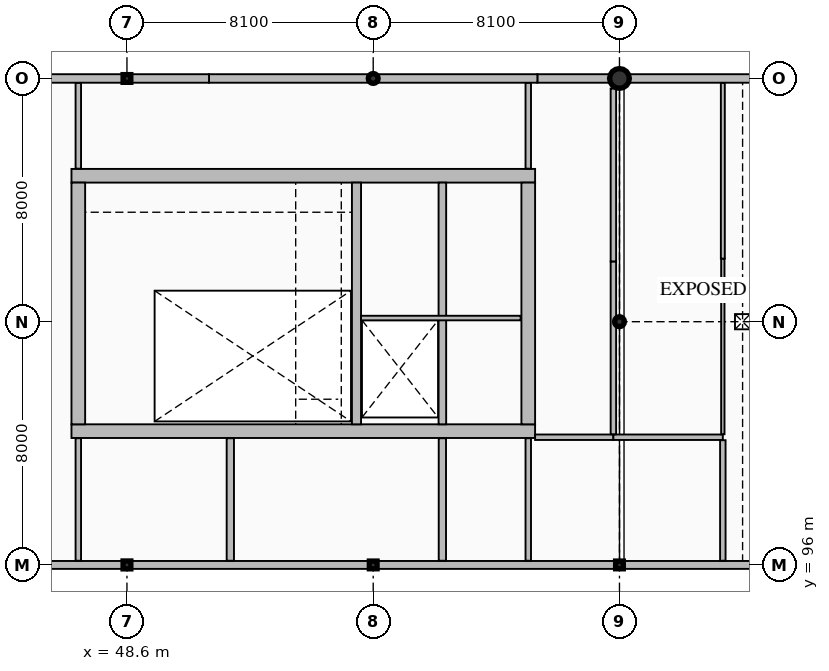
"""IFC4 building model, lengths in metres.
Left out: names, types, materials, properties, quantities, classifications, styles, units other than length and angle.
Written with IfcOpenShell. Run it as: python <this file> out.ifc"""

import sys

from ifc_helpers import new_model, si_unit, direction, frame, frame_2d, origin, origin_2d, place, context, subcontext, project, spatial, rectangle, hollow_rectangle, circle, hollow_circle, i_section, extrude, element, fill, save


model = new_model("IFC4")
c1 = context("Model", 3, precision=1e-05, world=origin(), true_north=direction((0.0, 1.0)))
c2 = subcontext(c1, "Body", "Model", "MODEL_VIEW")
j1 = project(units=[si_unit("LENGTHUNIT", "METRE"), si_unit("PLANEANGLEUNIT", "RADIAN")], contexts=[c1])
p1 = place(None, origin())
s1 = spatial("IfcSite", under=j1, at=p1, CompositionType="ELEMENT")
p2 = place(p1, origin())
s2 = spatial("IfcBuilding", under=s1, at=p2, CompositionType="ELEMENT")
p3 = place(p2, frame((0.0, 0.0, 29.1)))
s3 = spatial("IfcBuildingStorey", under=s2, at=p3, CompositionType="ELEMENT", Elevation=29.1)
p4 = place(p3, frame((46.775, 100.4, 0.0), z_axis=(0.0, 0.0, 1.0), x_axis=(1.0, 0.0, 0.0)))
e1 = element("IfcWall", 1, at=p4, inside=s3, PredefinedType="SHEAR", context=c2, shape_type="SweptSolid", body=[
    extrude(rectangle(XDim=15.25, YDim=0.45, at=frame_2d((7.625, 0.0))), origin(), (0.0, 0.0, 1.0), 4.2),
])
p5 = place(p4, frame((0.975, 0.0, 0.0)))
e2 = element("IfcOpeningElement", 2, at=p5, cuts=e1, PredefinedType="OPENING", context=c2, shape_type="SweptSolid", body=[
    extrude(rectangle(XDim=1.15, YDim=2.25, at=frame_2d((0.575, 1.125))), frame((0.0, 0.235, 0.0), z_axis=(0.0, -1.0, 0.0), x_axis=(1.0, 0.0, 0.0)), (0.0, 0.0, 1.0), 0.47),
])
p6 = place(p4, frame((10.258, 0.0, 0.0)))
e3 = element("IfcOpeningElement", 3, at=p6, cuts=e1, PredefinedType="OPENING", context=c2, shape_type="SweptSolid", body=[
    extrude(rectangle(XDim=1.1, YDim=2.2, at=frame_2d((0.55, 1.1))), frame((0.0, 0.235, 0.0), z_axis=(0.0, -1.0, 0.0), x_axis=(1.0, 0.0, 0.0)), (0.0, 0.0, 1.0), 0.47),
])
p7 = place(p4, frame((12.972, 0.0, 0.0)))
e4 = element("IfcOpeningElement", 4, at=p7, cuts=e1, PredefinedType="OPENING", context=c2, shape_type="SweptSolid", body=[
    extrude(rectangle(XDim=1.1, YDim=2.2, at=frame_2d((0.55, 1.1))), frame((0.0, 0.235, 0.0), z_axis=(0.0, -1.0, 0.0), x_axis=(1.0, 0.0, 0.0)), (0.0, 0.0, 1.0), 0.47),
])
p8 = place(p3, frame((46.775, 108.8, 0.0), z_axis=(0.0, 0.0, 1.0), x_axis=(1.0, 0.0, 0.0)))
e5 = element("IfcWall", 5, at=p8, inside=s3, PredefinedType="SHEAR", context=c2, shape_type="SweptSolid", body=[
    extrude(rectangle(XDim=15.25, YDim=0.45, at=frame_2d((7.625, 0.0))), origin(), (0.0, 0.0, 1.0), 4.2),
])
for number, where, z_axis, x_axis in (
    (6, (47.0, 100.625, 0.0), (0.0, 0.0, 1.0), (0.0, 1.0, 0.0)),
    (7, (61.8, 100.625, 0.0), (0.0, 0.0, 1.0), (0.0, 1.0, 0.0)),
):
    element("IfcWall", number, at=place(p3, frame(where, z_axis=z_axis, x_axis=x_axis)), inside=s3, PredefinedType="SHEAR", context=c2, shape_type="SweptSolid", body=[
        extrude(rectangle(XDim=7.95, YDim=0.45, at=frame_2d((3.975, 0.0))), origin(), (0.0, 0.0, 1.0), 4.2),
    ])
p9 = place(p3, frame((56.15, 100.625, 0.0), z_axis=(0.0, 0.0, 1.0), x_axis=(0.0, 1.0, 0.0)))
e8 = element("IfcWall", 8, at=p9, inside=s3, PredefinedType="SHEAR", context=c2, shape_type="SweptSolid", body=[
    extrude(rectangle(XDim=7.95, YDim=0.3, at=frame_2d((3.975, 0.0))), origin(), (0.0, 0.0, 1.0), 4.2),
])
p10 = place(p3, frame((58.975, 100.625, 0.0), z_axis=(0.0, 0.0, 1.0), x_axis=(0.0, 1.0, 0.0)))
e9 = element("IfcWall", 9, at=p10, inside=s3, PredefinedType="SHEAR", context=c2, shape_type="SweptSolid", body=[
    extrude(rectangle(XDim=7.95, YDim=0.25, at=frame_2d((3.975, 0.0))), origin(), (0.0, 0.0, 1.0), 4.2),
])
p11 = place(p3, frame((48.6, 96.0, 0.0), z_axis=(0.0, 0.0, 1.0), x_axis=(1.0, 0.0, 0.0)))
e10 = element("IfcColumn", 10, at=p11, inside=s3, PredefinedType="COLUMN", context=c2, shape_type="SweptSolid", body=[
    extrude(i_section(OverallWidth=0.256, OverallDepth=0.26, WebThickness=0.011, FlangeThickness=0.017, FilletRadius=0.013, at=origin_2d()), origin(), (0.0, 0.0, 1.0), 4.2),
])
for number, where, z_axis, x_axis in (
    (11, (48.6, 112.0, 0.0), (0.0, 0.0, 1.0), (1.0, 0.0, 0.0)),
    (12, (56.7, 96.0, 0.0), (0.0, 0.0, 1.0), (1.0, 0.0, 0.0)),
):
    element("IfcColumn", number, at=place(p3, frame(where, z_axis=z_axis, x_axis=x_axis)), inside=s3, PredefinedType="COLUMN", context=c2, shape_type="SweptSolid", body=[
        extrude(hollow_rectangle(XDim=0.254, YDim=0.254, WallThickness=0.013, InnerFilletRadius=0.013, OuterFilletRadius=0.025, at=origin_2d()), origin(), (0.0, 0.0, 1.0), 4.2),
    ])
p12 = place(p3, frame((56.7, 112.0, 0.0), z_axis=(0.0, 0.0, 1.0), x_axis=(1.0, 0.0, 0.0)))
e13 = element("IfcColumn", 13, at=p12, inside=s3, PredefinedType="COLUMN", context=c2, shape_type="SweptSolid", body=[
    extrude(hollow_circle(Radius=0.162, WallThickness=0.013, at=origin_2d()), origin(), (0.0, 0.0, 1.0), 4.2),
])
p13 = place(p3, frame((64.8, 96.0, 0.0), z_axis=(0.0, 0.0, 1.0), x_axis=(1.0, 0.0, 0.0)))
e14 = element("IfcColumn", 14, at=p13, inside=s3, PredefinedType="COLUMN", context=c2, shape_type="SweptSolid", body=[
    extrude(hollow_rectangle(XDim=0.254, YDim=0.254, WallThickness=0.013, InnerFilletRadius=0.013, OuterFilletRadius=0.025, at=origin_2d()), origin(), (0.0, 0.0, 1.0), 4.2),
])
p14 = place(p3, frame((64.8, 104.0, 0.0), z_axis=(0.0, 0.0, 1.0), x_axis=(1.0, 0.0, 0.0)))
e15 = element("IfcColumn", 15, at=p14, inside=s3, PredefinedType="COLUMN", context=c2, shape_type="SweptSolid", body=[
    extrude(hollow_circle(Radius=0.162, WallThickness=0.013, at=origin_2d()), origin(), (0.0, 0.0, 1.0), 4.2),
])
p15 = place(p3, frame((64.8, 112.0, 0.0), z_axis=(0.0, 0.0, 1.0), x_axis=(1.0, 0.0, 0.0)))
e16 = element("IfcColumn", 16, at=p15, inside=s3, PredefinedType="COLUMN", context=c2, shape_type="SweptSolid", body=[
    extrude(circle(Radius=0.325, at=origin_2d()), origin(), (0.0, 0.0, 1.0), 4.2),
])
p16 = place(p3, frame((40.68, 96.0, 0.0), z_axis=(0.0, 0.0, 1.0), x_axis=(1.0, 0.0, 0.0)))
e17 = element("IfcWall", 17, at=p16, inside=s3, PredefinedType="SOLIDWALL", context=c2, shape_type="SweptSolid", body=[
    extrude(rectangle(XDim=16.11, YDim=0.26, at=frame_2d((8.055, 0.0))), origin(), (0.0, 0.0, 1.0), 3.402),
])
p17 = place(p3, frame((56.79, 96.0, 0.0), z_axis=(0.0, 0.0, 1.0), x_axis=(1.0, 0.0, 0.0)))
e18 = element("IfcWall", 18, at=p17, inside=s3, PredefinedType="SOLIDWALL", context=c2, shape_type="SweptSolid", body=[
    extrude(rectangle(XDim=16.11, YDim=0.26, at=frame_2d((8.055, 0.0))), origin(), (0.0, 0.0, 1.0), 3.302),
])
p18 = place(p3, frame((72.9, 112.0, 0.0), z_axis=(0.0, 0.0, 1.0), x_axis=(-1.0, 0.0, 0.0)))
e19 = element("IfcWall", 19, at=p18, inside=s3, PredefinedType="SOLIDWALL", context=c2, shape_type="SweptSolid", body=[
    extrude(rectangle(XDim=10.8, YDim=0.28, at=frame_2d((5.4, 0.0))), origin(), (0.0, 0.0, 1.0), 3.302),
])
p19 = place(p3, frame((62.1, 112.0, 0.0), z_axis=(0.0, 0.0, 1.0), x_axis=(-1.0, 0.0, 0.0)))
e20 = element("IfcWall", 20, at=p19, inside=s3, PredefinedType="SOLIDWALL", context=c2, shape_type="SweptSolid", body=[
    extrude(rectangle(XDim=10.8, YDim=0.28, at=frame_2d((5.4, 0.0))), origin(), (0.0, 0.0, 1.0), 3.302),
])
p20 = place(p19, frame((2.7, 0.0, 0.95)))
e21 = element("IfcOpeningElement", 21, at=p20, cuts=e20, PredefinedType="OPENING", context=c2, shape_type="SweptSolid", body=[
    extrude(rectangle(XDim=1.6, YDim=1.4, at=frame_2d((0.8, 0.7))), frame((0.0, 0.15, 0.0), z_axis=(0.0, -1.0, 0.0), x_axis=(1.0, 0.0, 0.0)), (0.0, 0.0, 1.0), 0.3),
])
p21 = place(p3, frame((51.3, 112.0, 0.0), z_axis=(0.0, 0.0, 1.0), x_axis=(-1.0, 0.0, 0.0)))
e22 = element("IfcWall", 22, at=p21, inside=s3, PredefinedType="SOLIDWALL", context=c2, shape_type="SweptSolid", body=[
    extrude(rectangle(XDim=10.8, YDim=0.28, at=frame_2d((5.4, 0.0))), origin(), (0.0, 0.0, 1.0), 3.402),
])
p22 = place(p21, frame((4.95, 0.0, 0.95)))
e23 = element("IfcOpeningElement", 23, at=p22, cuts=e22, PredefinedType="OPENING", context=c2, shape_type="SweptSolid", body=[
    extrude(rectangle(XDim=0.9, YDim=1.8, at=frame_2d((0.45, 0.9))), frame((0.0, 0.15, 0.0), z_axis=(0.0, -1.0, 0.0), x_axis=(1.0, 0.0, 0.0)), (0.0, 0.0, 1.0), 0.3),
])
p23 = place(p3, frame((56.3, 104.12, 0.0), z_axis=(0.0, 0.0, 1.0), x_axis=(1.0, 0.0, 0.0)))
e24 = element("IfcWall", 24, at=p23, inside=s3, PredefinedType="PARTITIONING", context=c2, shape_type="SweptSolid", body=[
    extrude(rectangle(XDim=5.25, YDim=0.15, at=frame_2d((2.625, 0.0))), origin(), (0.0, 0.0, 1.0), 3.96),
])
p24 = place(p3, frame((62.025, 100.2, 0.0), z_axis=(0.0, 0.0, 1.0), x_axis=(1.0, 0.0, 0.0)))
e25 = element("IfcWall", 25, at=p24, inside=s3, PredefinedType="PARTITIONING", context=c2, shape_type="SweptSolid", body=[
    extrude(rectangle(XDim=2.575, YDim=0.18, at=frame_2d((1.288, 0.0))), origin(), (0.0, 0.0, 1.0), 3.96),
])
p25 = place(p24, frame((0.688, 0.0, 0.0)))
e26 = element("IfcOpeningElement", 26, at=p25, cuts=e25, PredefinedType="OPENING", context=c2, shape_type="SweptSolid", body=[
    extrude(rectangle(XDim=1.2, YDim=2.2, at=frame_2d((0.6, 1.1))), frame((0.0, 0.1, 0.0), z_axis=(0.0, -1.0, 0.0), x_axis=(1.0, 0.0, 0.0)), (0.0, 0.0, 1.0), 0.2),
])
p26 = place(p3, frame((64.6, 100.2, 0.0), z_axis=(0.0, 0.0, 1.0), x_axis=(1.0, 0.0, 0.0)))
e27 = element("IfcWall", 27, at=p26, inside=s3, PredefinedType="PARTITIONING", context=c2, shape_type="SweptSolid", body=[
    extrude(rectangle(XDim=3.6, YDim=0.18, at=frame_2d((1.8, 0.0))), origin(), (0.0, 0.0, 1.0), 3.96),
])
p27 = place(p26, frame((1.3, 0.0, 0.0)))
e28 = element("IfcOpeningElement", 28, at=p27, cuts=e27, PredefinedType="OPENING", context=c2, shape_type="SweptSolid", body=[
    extrude(rectangle(XDim=1.0, YDim=2.2, at=frame_2d((0.5, 1.1))), frame((0.0, 0.1, 0.0), z_axis=(0.0, -1.0, 0.0), x_axis=(1.0, 0.0, 0.0)), (0.0, 0.0, 1.0), 0.2),
])
p28 = place(p3, frame((47.0, 96.138, 0.0), z_axis=(0.0, 0.0, 1.0), x_axis=(0.0, 1.0, 0.0)))
e29 = element("IfcWall", 29, at=p28, inside=s3, PredefinedType="PARTITIONING", context=c2, shape_type="SweptSolid", body=[
    extrude(rectangle(XDim=4.029, YDim=0.18, at=frame_2d((2.015, 0.0))), origin(), (0.0, 0.0, 1.0), 3.96),
])
p29 = place(p28, frame((1.465, 0.0, 0.0)))
e30 = element("IfcOpeningElement", 30, at=p29, cuts=e29, PredefinedType="OPENING", context=c2, shape_type="SweptSolid", body=[
    extrude(rectangle(XDim=1.1, YDim=2.2, at=frame_2d((0.55, 1.1))), frame((0.0, 0.1, 0.0), z_axis=(0.0, -1.0, 0.0), x_axis=(1.0, 0.0, 0.0)), (0.0, 0.0, 1.0), 0.2),
])
p30 = place(p3, frame((47.0, 109.033, 0.0), z_axis=(0.0, 0.0, 1.0), x_axis=(0.0, 1.0, 0.0)))
e31 = element("IfcWall", 31, at=p30, inside=s3, PredefinedType="PARTITIONING", context=c2, shape_type="SweptSolid", body=[
    extrude(rectangle(XDim=2.819, YDim=0.18, at=frame_2d((1.41, 0.0))), origin(), (0.0, 0.0, 1.0), 3.96),
])
p31 = place(p30, frame((0.86, 0.0, 0.0)))
e32 = element("IfcOpeningElement", 32, at=p31, cuts=e31, PredefinedType="OPENING", context=c2, shape_type="SweptSolid", body=[
    extrude(rectangle(XDim=1.1, YDim=2.2, at=frame_2d((0.55, 1.1))), frame((0.0, 0.1, 0.0), z_axis=(0.0, -1.0, 0.0), x_axis=(1.0, 0.0, 0.0)), (0.0, 0.0, 1.0), 0.2),
])
p32 = place(p3, frame((52.0, 96.138, 0.0), z_axis=(0.0, 0.0, 1.0), x_axis=(0.0, 1.0, 0.0)))
e33 = element("IfcWall", 33, at=p32, inside=s3, PredefinedType="PARTITIONING", context=c2, shape_type="SweptSolid", body=[
    extrude(rectangle(XDim=4.029, YDim=0.24, at=frame_2d((2.015, 0.0))), origin(), (0.0, 0.0, 1.0), 3.96),
])
p33 = place(p32, frame((1.415, 0.0, 0.0)))
e34 = element("IfcOpeningElement", 34, at=p33, cuts=e33, PredefinedType="OPENING", context=c2, shape_type="SweptSolid", body=[
    extrude(rectangle(XDim=1.2, YDim=2.3, at=frame_2d((0.6, 1.15))), frame((0.0, 0.13, 0.0), z_axis=(0.0, -1.0, 0.0), x_axis=(1.0, 0.0, 0.0)), (0.0, 0.0, 1.0), 0.26),
])
p34 = place(p3, frame((58.975, 96.138, 0.0), z_axis=(0.0, 0.0, 1.0), x_axis=(0.0, 1.0, 0.0)))
e35 = element("IfcWall", 35, at=p34, inside=s3, PredefinedType="PARTITIONING", context=c2, shape_type="SweptSolid", body=[
    extrude(rectangle(XDim=4.029, YDim=0.24, at=frame_2d((2.015, 0.0))), origin(), (0.0, 0.0, 1.0), 3.96),
])
p35 = place(p3, frame((61.8, 96.138, 0.0), z_axis=(0.0, 0.0, 1.0), x_axis=(0.0, 1.0, 0.0)))
e36 = element("IfcWall", 36, at=p35, inside=s3, PredefinedType="PARTITIONING", context=c2, shape_type="SweptSolid", body=[
    extrude(rectangle(XDim=4.029, YDim=0.18, at=frame_2d((2.015, 0.0))), origin(), (0.0, 0.0, 1.0), 3.96),
])
p36 = place(p35, frame((1.465, 0.0, 0.0)))
e37 = element("IfcOpeningElement", 37, at=p36, cuts=e36, PredefinedType="OPENING", context=c2, shape_type="SweptSolid", body=[
    extrude(rectangle(XDim=1.1, YDim=2.2, at=frame_2d((0.55, 1.1))), frame((0.0, 0.1, 0.0), z_axis=(0.0, -1.0, 0.0), x_axis=(1.0, 0.0, 0.0)), (0.0, 0.0, 1.0), 0.2),
])
p37 = place(p3, frame((61.8, 109.033, 0.0), z_axis=(0.0, 0.0, 1.0), x_axis=(0.0, 1.0, 0.0)))
e38 = element("IfcWall", 38, at=p37, inside=s3, PredefinedType="PARTITIONING", context=c2, shape_type="SweptSolid", body=[
    extrude(rectangle(XDim=2.819, YDim=0.18, at=frame_2d((1.41, 0.0))), origin(), (0.0, 0.0, 1.0), 3.96),
])
p38 = place(p37, frame((0.86, 0.0, 0.0)))
e39 = element("IfcOpeningElement", 39, at=p38, cuts=e38, PredefinedType="OPENING", context=c2, shape_type="SweptSolid", body=[
    extrude(rectangle(XDim=1.1, YDim=2.2, at=frame_2d((0.55, 1.1))), frame((0.0, 0.1, 0.0), z_axis=(0.0, -1.0, 0.0), x_axis=(1.0, 0.0, 0.0)), (0.0, 0.0, 1.0), 0.2),
])
p39 = place(p3, frame((64.6, 100.298, 0.0), z_axis=(0.0, 0.0, 1.0), x_axis=(0.0, 1.0, 0.0)))
e40 = element("IfcWall", 40, at=p39, inside=s3, PredefinedType="PARTITIONING", context=c2, shape_type="SweptSolid", body=[
    extrude(rectangle(XDim=5.684, YDim=0.18, at=frame_2d((2.842, 0.0))), origin(), (0.0, 0.0, 1.0), 3.352),
])
p40 = place(p3, frame((64.6, 105.982, 0.0), z_axis=(0.0, 0.0, 1.0), x_axis=(0.0, 1.0, 0.0)))
e41 = element("IfcWall", 41, at=p40, inside=s3, PredefinedType="PARTITIONING", context=c2, shape_type="SweptSolid", body=[
    extrude(rectangle(XDim=5.685, YDim=0.18, at=frame_2d((2.842, 0.0))), origin(), (0.0, 0.0, 1.0), 3.352),
])
p41 = place(p3, frame((68.2, 96.138, 0.0), z_axis=(0.0, 0.0, 1.0), x_axis=(0.0, 1.0, 0.0)))
e42 = element("IfcWall", 42, at=p41, inside=s3, PredefinedType="PARTITIONING", context=c2, shape_type="SweptSolid", body=[
    extrude(rectangle(XDim=3.964, YDim=0.18, at=frame_2d((1.982, 0.0))), origin(), (0.0, 0.0, 1.0), 3.96),
])
p42 = place(p41, frame((1.482, 0.0, 0.0)))
e43 = element("IfcOpeningElement", 43, at=p42, cuts=e42, PredefinedType="OPENING", context=c2, shape_type="SweptSolid", body=[
    extrude(rectangle(XDim=1.0, YDim=2.2, at=frame_2d((0.5, 1.1))), frame((0.0, 0.1, 0.0), z_axis=(0.0, -1.0, 0.0), x_axis=(1.0, 0.0, 0.0)), (0.0, 0.0, 1.0), 0.2),
])
p43 = place(p3, frame((68.2, 100.298, 0.0), z_axis=(0.0, 0.0, 1.0), x_axis=(0.0, 1.0, 0.0)))
e44 = element("IfcWall", 44, at=p43, inside=s3, PredefinedType="PARTITIONING", context=c2, shape_type="SweptSolid", body=[
    extrude(rectangle(XDim=5.777, YDim=0.11, at=frame_2d((2.888, 0.0))), origin(), (0.0, 0.0, 1.0), 3.96),
])
p44 = place(p3, frame((68.2, 106.075, 0.0), z_axis=(0.0, 0.0, 1.0), x_axis=(0.0, 1.0, 0.0)))
e45 = element("IfcWall", 45, at=p44, inside=s3, PredefinedType="PARTITIONING", context=c2, shape_type="SweptSolid", body=[
    extrude(rectangle(XDim=5.777, YDim=0.13, at=frame_2d((2.889, 0.0))), origin(), (0.0, 0.0, 1.0), 3.96),
])
p45 = place(p20, origin())
e46 = element("IfcWindow", 46, at=p45, inside=s3, PartitioningType="SINGLE_PANEL", PredefinedType="WINDOW", context=c2, shape_type="SweptSolid", body=[
    extrude(rectangle(XDim=1.6, YDim=1.4, at=frame_2d((0.8, 0.7))), frame((0.0, 0.03, 0.0), z_axis=(0.0, -1.0, 0.0), x_axis=(1.0, 0.0, 0.0)), (0.0, 0.0, 1.0), 0.06),
])
fill(e21, e46)
p46 = place(p22, origin())
e47 = element("IfcWindow", 47, at=p46, inside=s3, PartitioningType="SINGLE_PANEL", PredefinedType="WINDOW", context=c2, shape_type="SweptSolid", body=[
    extrude(rectangle(XDim=0.9, YDim=1.8, at=frame_2d((0.45, 0.9))), frame((0.0, 0.03, 0.0), z_axis=(0.0, -1.0, 0.0), x_axis=(1.0, 0.0, 0.0)), (0.0, 0.0, 1.0), 0.06),
])
fill(e23, e47)
p47 = place(p5, origin())
e48 = element("IfcDoor", 48, at=p47, inside=s3, OperationType="SINGLE_SWING_RIGHT", PredefinedType="DOOR", context=c2, shape_type="SweptSolid", body=[
    extrude(rectangle(XDim=1.15, YDim=2.25, at=frame_2d((0.575, 1.125))), frame((0.0, 0.025, 0.0), z_axis=(0.0, -1.0, 0.0), x_axis=(1.0, 0.0, 0.0)), (0.0, 0.0, 1.0), 0.05),
])
fill(e2, e48)
p48 = place(p6, frame((1.1, 0.0, 0.0), z_axis=(0.0, 0.0, 1.0), x_axis=(-1.0, 0.0, 0.0)))
e49 = element("IfcDoor", 49, at=p48, inside=s3, OperationType="DOUBLE_DOOR_SLIDING", PredefinedType="DOOR", context=c2, shape_type="SweptSolid", body=[
    extrude(rectangle(XDim=1.1, YDim=2.2, at=frame_2d((0.55, 1.1))), frame((0.0, 0.025, 0.0), z_axis=(0.0, -1.0, 0.0), x_axis=(1.0, 0.0, 0.0)), (0.0, 0.0, 1.0), 0.05),
])
fill(e3, e49)
p49 = place(p7, frame((1.1, 0.0, 0.0), z_axis=(0.0, 0.0, 1.0), x_axis=(-1.0, 0.0, 0.0)))
e50 = element("IfcDoor", 50, at=p49, inside=s3, OperationType="DOUBLE_DOOR_SLIDING", PredefinedType="DOOR", context=c2, shape_type="SweptSolid", body=[
    extrude(rectangle(XDim=1.1, YDim=2.2, at=frame_2d((0.55, 1.1))), frame((0.0, 0.025, 0.0), z_axis=(0.0, -1.0, 0.0), x_axis=(1.0, 0.0, 0.0)), (0.0, 0.0, 1.0), 0.05),
])
fill(e4, e50)
p50 = place(p25, frame((1.2, 0.0, 0.0), z_axis=(0.0, 0.0, 1.0), x_axis=(-1.0, 0.0, 0.0)))
e51 = element("IfcDoor", 51, at=p50, inside=s3, OperationType="SINGLE_SWING_RIGHT", PredefinedType="DOOR", context=c2, shape_type="SweptSolid", body=[
    extrude(rectangle(XDim=1.2, YDim=2.2, at=frame_2d((0.6, 1.1))), frame((0.0, 0.025, 0.0), z_axis=(0.0, -1.0, 0.0), x_axis=(1.0, 0.0, 0.0)), (0.0, 0.0, 1.0), 0.05),
])
fill(e26, e51)
p51 = place(p27, origin())
e52 = element("IfcDoor", 52, at=p51, inside=s3, OperationType="SINGLE_SWING_LEFT", PredefinedType="DOOR", context=c2, shape_type="SweptSolid", body=[
    extrude(rectangle(XDim=1.0, YDim=2.2, at=frame_2d((0.5, 1.1))), frame((0.0, 0.025, 0.0), z_axis=(0.0, -1.0, 0.0), x_axis=(1.0, 0.0, 0.0)), (0.0, 0.0, 1.0), 0.05),
])
fill(e28, e52)
p52 = place(p29, origin())
e53 = element("IfcDoor", 53, at=p52, inside=s3, OperationType="SINGLE_SWING_RIGHT", PredefinedType="DOOR", context=c2, shape_type="SweptSolid", body=[
    extrude(rectangle(XDim=1.1, YDim=2.2, at=frame_2d((0.55, 1.1))), frame((0.0, 0.025, 0.0), z_axis=(0.0, -1.0, 0.0), x_axis=(1.0, 0.0, 0.0)), (0.0, 0.0, 1.0), 0.05),
])
fill(e30, e53)
p53 = place(p31, frame((1.1, 0.0, 0.0), z_axis=(0.0, 0.0, 1.0), x_axis=(-1.0, 0.0, 0.0)))
e54 = element("IfcDoor", 54, at=p53, inside=s3, OperationType="SINGLE_SWING_LEFT", PredefinedType="DOOR", context=c2, shape_type="SweptSolid", body=[
    extrude(rectangle(XDim=1.1, YDim=2.2, at=frame_2d((0.55, 1.1))), frame((0.0, 0.025, 0.0), z_axis=(0.0, -1.0, 0.0), x_axis=(1.0, 0.0, 0.0)), (0.0, 0.0, 1.0), 0.05),
])
fill(e32, e54)
p54 = place(p33, origin())
e55 = element("IfcDoor", 55, at=p54, inside=s3, OperationType="SINGLE_SWING_RIGHT", PredefinedType="DOOR", context=c2, shape_type="SweptSolid", body=[
    extrude(rectangle(XDim=1.2, YDim=2.3, at=frame_2d((0.6, 1.15))), frame((0.0, 0.025, 0.0), z_axis=(0.0, -1.0, 0.0), x_axis=(1.0, 0.0, 0.0)), (0.0, 0.0, 1.0), 0.05),
])
fill(e34, e55)
p55 = place(p36, frame((1.1, 0.0, 0.0), z_axis=(0.0, 0.0, 1.0), x_axis=(-1.0, 0.0, 0.0)))
e56 = element("IfcDoor", 56, at=p55, inside=s3, OperationType="SINGLE_SWING_LEFT", PredefinedType="DOOR", context=c2, shape_type="SweptSolid", body=[
    extrude(rectangle(XDim=1.1, YDim=2.2, at=frame_2d((0.55, 1.1))), frame((0.0, 0.025, 0.0), z_axis=(0.0, -1.0, 0.0), x_axis=(1.0, 0.0, 0.0)), (0.0, 0.0, 1.0), 0.05),
])
fill(e37, e56)
p56 = place(p38, origin())
e57 = element("IfcDoor", 57, at=p56, inside=s3, OperationType="SINGLE_SWING_RIGHT", PredefinedType="DOOR", context=c2, shape_type="SweptSolid", body=[
    extrude(rectangle(XDim=1.1, YDim=2.2, at=frame_2d((0.55, 1.1))), frame((0.0, 0.025, 0.0), z_axis=(0.0, -1.0, 0.0), x_axis=(1.0, 0.0, 0.0)), (0.0, 0.0, 1.0), 0.05),
])
fill(e39, e57)
p57 = place(p42, frame((1.0, 0.0, 0.0), z_axis=(0.0, 0.0, 1.0), x_axis=(-1.0, 0.0, 0.0)))
e58 = element("IfcDoor", 58, at=p57, inside=s3, OperationType="SINGLE_SWING_LEFT", PredefinedType="DOOR", context=c2, shape_type="SweptSolid", body=[
    extrude(rectangle(XDim=1.0, YDim=2.2, at=frame_2d((0.5, 1.1))), frame((0.0, 0.025, 0.0), z_axis=(0.0, -1.0, 0.0), x_axis=(1.0, 0.0, 0.0)), (0.0, 0.0, 1.0), 0.05),
])
fill(e43, e58)
save(model, sys.argv[1])
